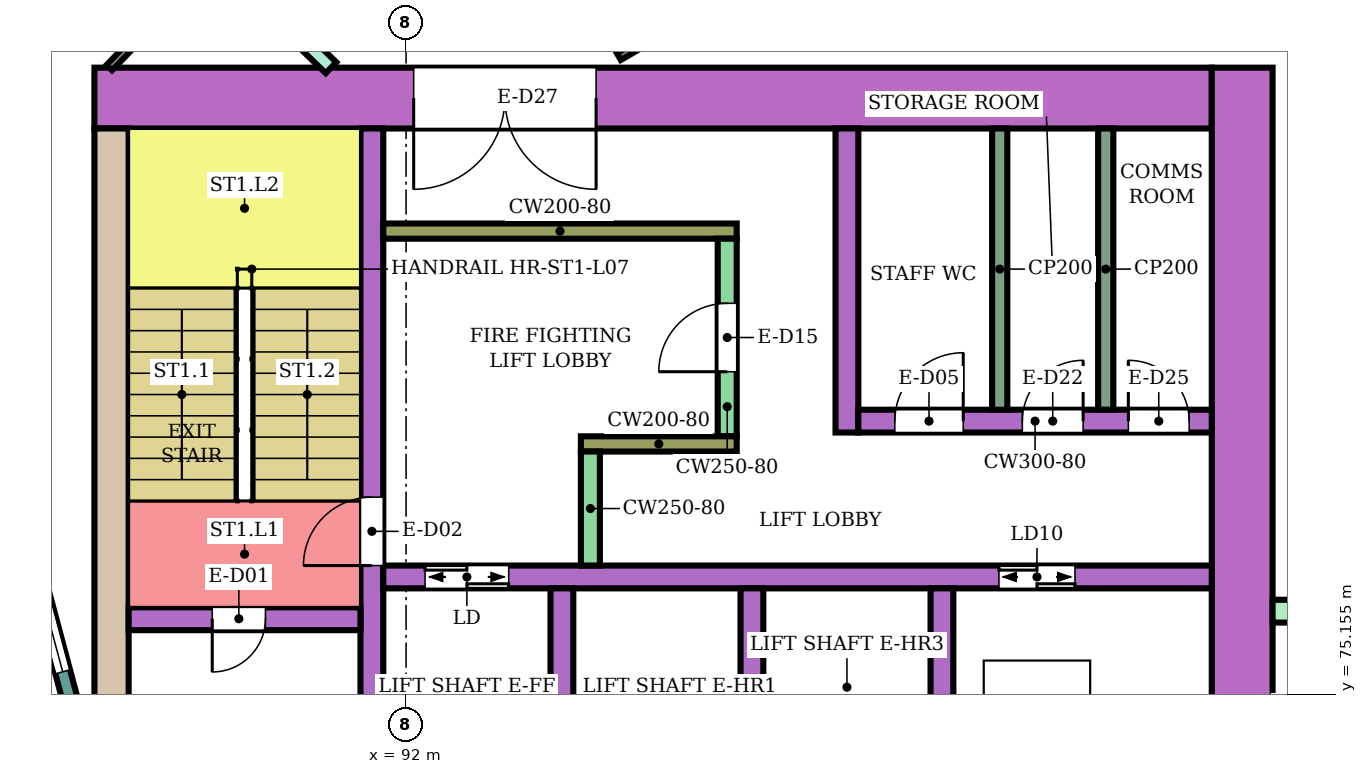
"""IFC4 building model, lengths in metres.
Left out: names, types, materials, properties, quantities, classifications, styles, units other than length and angle.
Written with IfcOpenShell. Run it as: python <this file> out.ifc"""

import sys

from ifc_helpers import new_model, si_unit, direction, frame, frame_2d, origin, place, context, subcontext, project, spatial, rectangle, extrude, element, fill, save


model = new_model("IFC4")
c1 = context("Model", 3, precision=1e-05, world=origin(), true_north=direction((0.0, 1.0)))
c2 = subcontext(c1, "Body", "Model", "MODEL_VIEW")
j1 = project(units=[si_unit("LENGTHUNIT", "METRE"), si_unit("PLANEANGLEUNIT", "RADIAN")], contexts=[c1])
p1 = place(None, origin())
s1 = spatial("IfcSite", under=j1, at=p1, CompositionType="ELEMENT")
p2 = place(p1, origin())
s2 = spatial("IfcBuilding", under=s1, at=p2, CompositionType="ELEMENT")
p3 = place(p2, frame((0.0, 0.0, 36.4)))
s3 = spatial("IfcBuildingStorey", under=s2, at=p3, CompositionType="ELEMENT", Elevation=36.4)
p4 = place(p3, frame((87.9, 83.0, 0.0), z_axis=(0.0, 0.0, 1.0), x_axis=(1.0, 0.0, 0.0)))
e1 = element("IfcWall", 1, at=p4, inside=s3, PredefinedType="SHEAR", context=c2, shape_type="SweptSolid", body=[
    extrude(rectangle(XDim=14.7, YDim=0.8, at=frame_2d((7.35, 0.0))), origin(), (0.0, 0.0, 1.0), 3.48),
])
p5 = place(p4, frame((4.2, 0.0, 0.0)))
e2 = element("IfcOpeningElement", 2, at=p5, cuts=e1, PredefinedType="OPENING", context=c2, shape_type="SweptSolid", body=[
    extrude(rectangle(XDim=2.4, YDim=2.4, at=frame_2d((1.2, 1.2))), frame((0.0, 0.41, 0.0), z_axis=(0.0, -1.0, 0.0), x_axis=(1.0, 0.0, 0.0)), (0.0, 0.0, 1.0), 0.82),
])
p6 = place(p3, frame((88.125, 75.0, 0.0), z_axis=(0.0, 0.0, 1.0), x_axis=(0.0, 1.0, 0.0)))
e3 = element("IfcWall", 3, at=p6, inside=s3, PredefinedType="SHEAR", context=c2, shape_type="SweptSolid", body=[
    extrude(rectangle(XDim=7.6, YDim=0.45, at=frame_2d((3.8, 0.0))), origin(), (0.0, 0.0, 1.0), 3.48),
])
p7 = place(p3, frame((103.0, 66.6, 0.0), z_axis=(0.0, 0.0, 1.0), x_axis=(0.0, 1.0, 0.0)))
e4 = element("IfcWall", 4, at=p7, inside=s3, PredefinedType="SHEAR", context=c2, shape_type="SweptSolid", body=[
    extrude(rectangle(XDim=16.8, YDim=0.8, at=frame_2d((8.4, 0.0))), origin(), (0.0, 0.0, 1.0), 3.48),
])
p8 = place(p3, frame((91.55, 75.0, 0.0), z_axis=(0.0, 0.0, 1.0), x_axis=(0.0, 1.0, 0.0)))
e5 = element("IfcWall", 5, at=p8, inside=s3, PredefinedType="SHEAR", context=c2, shape_type="SweptSolid", body=[
    extrude(rectangle(XDim=7.6, YDim=0.3, at=frame_2d((3.8, 0.0))), origin(), (0.0, 0.0, 1.0), 3.48),
])
p9 = place(p8, frame((1.85, 0.0, 0.0)))
e6 = element("IfcOpeningElement", 6, at=p9, cuts=e5, PredefinedType="OPENING", context=c2, shape_type="SweptSolid", body=[
    extrude(rectangle(XDim=0.9, YDim=2.1, at=frame_2d((0.45, 1.05))), frame((0.0, 0.16, 0.0), z_axis=(0.0, -1.0, 0.0), x_axis=(1.0, 0.0, 0.0)), (0.0, 0.0, 1.0), 0.32),
])
p10 = place(p3, frame((88.35, 76.15, 0.0), z_axis=(0.0, 0.0, 1.0), x_axis=(1.0, 0.0, 0.0)))
e7 = element("IfcWall", 7, at=p10, inside=s3, PredefinedType="SHEAR", context=c2, shape_type="SweptSolid", body=[
    extrude(rectangle(XDim=3.05, YDim=0.3, at=frame_2d((1.525, 0.0))), origin(), (0.0, 0.0, 1.0), 3.48),
])
p11 = place(p10, frame((1.1, 0.0, 0.0)))
e8 = element("IfcOpeningElement", 8, at=p11, cuts=e7, PredefinedType="OPENING", context=c2, shape_type="SweptSolid", body=[
    extrude(rectangle(XDim=0.7, YDim=2.0, at=frame_2d((0.35, 1.0))), frame((0.0, 0.16, 0.0), z_axis=(0.0, -1.0, 0.0), x_axis=(1.0, 0.0, 0.0)), (0.0, 0.0, 1.0), 0.32),
])
p12 = place(p3, frame((91.7, 76.7, 0.0), z_axis=(0.0, 0.0, 1.0), x_axis=(1.0, 0.0, 0.0)))
e9 = element("IfcWall", 9, at=p12, inside=s3, PredefinedType="SHEAR", context=c2, shape_type="SweptSolid", body=[
    extrude(rectangle(XDim=10.9, YDim=0.3, at=frame_2d((5.45, 0.0))), origin(), (0.0, 0.0, 1.0), 3.48),
])
p13 = place(p12, frame((0.55, 0.0, 0.0)))
e10 = element("IfcOpeningElement", 10, at=p13, cuts=e9, PredefinedType="OPENING", context=c2, shape_type="SweptSolid", body=[
    extrude(rectangle(XDim=1.1, YDim=2.1, at=frame_2d((0.55, 1.05))), frame((0.0, 0.16, 0.0), z_axis=(0.0, -1.0, 0.0), x_axis=(1.0, 0.0, 0.0)), (0.0, 0.0, 1.0), 0.32),
])
p14 = place(p12, frame((8.1, 0.0, 0.0)))
e11 = element("IfcOpeningElement", 11, at=p14, cuts=e9, PredefinedType="OPENING", context=c2, shape_type="SweptSolid", body=[
    extrude(rectangle(XDim=1.0, YDim=2.1, at=frame_2d((0.5, 1.05))), frame((0.0, 0.16, 0.0), z_axis=(0.0, -1.0, 0.0), x_axis=(1.0, 0.0, 0.0)), (0.0, 0.0, 1.0), 0.32),
])
for number, where, z_axis, x_axis in (
    (12, (94.05, 74.0, 0.0), (0.0, 0.0, 1.0), (0.0, 1.0, 0.0)),
    (13, (96.55, 74.0, 0.0), (0.0, 0.0, 1.0), (0.0, 1.0, 0.0)),
    (14, (99.05, 74.0, 0.0), (0.0, 0.0, 1.0), (0.0, 1.0, 0.0)),
):
    element("IfcWall", number, at=place(p3, frame(where, z_axis=z_axis, x_axis=x_axis)), inside=s3, PredefinedType="SHEAR", context=c2, shape_type="SweptSolid", body=[
        extrude(rectangle(XDim=2.55, YDim=0.3, at=frame_2d((1.275, 0.0))), origin(), (0.0, 0.0, 1.0), 3.48),
    ])
p15 = place(p3, frame((91.7, 81.25, 0.0), z_axis=(0.0, 0.0, 1.0), x_axis=(1.0, 0.0, 0.0)))
e15 = element("IfcWall", 15, at=p15, inside=s3, PredefinedType="SHEAR", context=c2, shape_type="SweptSolid", body=[
    extrude(rectangle(XDim=4.65, YDim=0.2, at=frame_2d((2.325, 0.0))), origin(), (0.0, 0.0, 1.0), 3.48),
])
p16 = place(p3, frame((96.225, 78.55, 0.0), z_axis=(0.0, 0.0, 1.0), x_axis=(0.0, 1.0, 0.0)))
e16 = element("IfcWall", 16, at=p16, inside=s3, PredefinedType="SHEAR", context=c2, shape_type="SweptSolid", body=[
    extrude(rectangle(XDim=2.6, YDim=0.25, at=frame_2d((1.3, 0.0))), origin(), (0.0, 0.0, 1.0), 3.48),
])
p17 = place(p16, frame((0.85, 0.0, 0.0)))
e17 = element("IfcOpeningElement", 17, at=p17, cuts=e16, PredefinedType="OPENING", context=c2, shape_type="SweptSolid", body=[
    extrude(rectangle(XDim=0.9, YDim=2.1, at=frame_2d((0.45, 1.05))), frame((0.0, 0.135, 0.0), z_axis=(0.0, -1.0, 0.0), x_axis=(1.0, 0.0, 0.0)), (0.0, 0.0, 1.0), 0.27),
])
p18 = place(p3, frame((94.3, 78.45, 0.0), z_axis=(0.0, 0.0, 1.0), x_axis=(1.0, 0.0, 0.0)))
e18 = element("IfcWall", 18, at=p18, inside=s3, PredefinedType="SHEAR", context=c2, shape_type="SweptSolid", body=[
    extrude(rectangle(XDim=2.05, YDim=0.2, at=frame_2d((1.025, 0.0))), origin(), (0.0, 0.0, 1.0), 3.48),
])
p19 = place(p3, frame((94.425, 76.85, 0.0), z_axis=(0.0, 0.0, 1.0), x_axis=(0.0, 1.0, 0.0)))
e19 = element("IfcWall", 19, at=p19, inside=s3, PredefinedType="SHEAR", context=c2, shape_type="SweptSolid", body=[
    extrude(rectangle(XDim=1.5, YDim=0.25, at=frame_2d((0.75, 0.0))), origin(), (0.0, 0.0, 1.0), 3.48),
])
p20 = place(p3, frame((97.8, 78.6, 0.0), z_axis=(0.0, 0.0, 1.0), x_axis=(0.0, 1.0, 0.0)))
e20 = element("IfcWall", 20, at=p20, inside=s3, PredefinedType="SHEAR", context=c2, shape_type="SweptSolid", body=[
    extrude(rectangle(XDim=4.0, YDim=0.3, at=frame_2d((2.0, 0.0))), origin(), (0.0, 0.0, 1.0), 3.48),
])
p21 = place(p3, frame((97.95, 78.75, 0.0), z_axis=(0.0, 0.0, 1.0), x_axis=(1.0, 0.0, 0.0)))
e21 = element("IfcWall", 21, at=p21, inside=s3, PredefinedType="SHEAR", context=c2, shape_type="SweptSolid", body=[
    extrude(rectangle(XDim=4.65, YDim=0.3, at=frame_2d((2.325, 0.0))), origin(), (0.0, 0.0, 1.0), 3.48),
])
p22 = place(p21, frame((0.48, 0.0, 0.0)))
e22 = element("IfcOpeningElement", 22, at=p22, cuts=e21, PredefinedType="OPENING", context=c2, shape_type="SweptSolid", body=[
    extrude(rectangle(XDim=0.9, YDim=2.1, at=frame_2d((0.45, 1.05))), frame((0.0, 0.16, 0.0), z_axis=(0.0, -1.0, 0.0), x_axis=(1.0, 0.0, 0.0)), (0.0, 0.0, 1.0), 0.32),
])
p23 = place(p21, frame((2.157, 0.0, 0.0)))
e23 = element("IfcOpeningElement", 23, at=p23, cuts=e21, PredefinedType="OPENING", context=c2, shape_type="SweptSolid", body=[
    extrude(rectangle(XDim=0.8, YDim=2.1, at=frame_2d((0.4, 1.05))), frame((0.0, 0.16, 0.0), z_axis=(0.0, -1.0, 0.0), x_axis=(1.0, 0.0, 0.0)), (0.0, 0.0, 1.0), 0.32),
])
p24 = place(p21, frame((3.552, 0.0, 0.0)))
e24 = element("IfcOpeningElement", 24, at=p24, cuts=e21, PredefinedType="OPENING", context=c2, shape_type="SweptSolid", body=[
    extrude(rectangle(XDim=0.8, YDim=2.1, at=frame_2d((0.4, 1.05))), frame((0.0, 0.16, 0.0), z_axis=(0.0, -1.0, 0.0), x_axis=(1.0, 0.0, 0.0)), (0.0, 0.0, 1.0), 0.32),
])
p25 = place(p3, frame((103.4, 76.25, 0.0), z_axis=(0.0, 0.0, 1.0), x_axis=(1.0, 0.0, 0.0)))
e25 = element("IfcWall", 25, at=p25, inside=s3, PredefinedType="NOTDEFINED", context=c2, shape_type="SweptSolid", body=[
    extrude(rectangle(XDim=2.416, YDim=0.3, at=frame_2d((1.208, 0.0))), origin(), (0.0, 0.0, 1.0), 3.8),
])
p26 = place(p3, frame((87.604, 75.0, 0.0), z_axis=(0.0, 0.0, 1.0), x_axis=(-0.258789828301, 0.965933654434, 0.0)))
e26 = element("IfcWall", 26, at=p26, inside=s3, PredefinedType="NOTDEFINED", context=c2, shape_type="SweptSolid", body=[
    extrude(rectangle(XDim=3.936, YDim=0.2, at=frame_2d((1.968, 0.0))), origin(), (0.0, 0.0, 1.0), 3.8),
])
p27 = place(p26, frame((0.468, 0.0, 0.9)))
e27 = element("IfcOpeningElement", 27, at=p27, cuts=e26, PredefinedType="OPENING", context=c2, shape_type="SweptSolid", body=[
    extrude(rectangle(XDim=3.0, YDim=2.3, at=frame_2d((1.5, 1.15))), frame((0.0, 0.11, 0.0), z_axis=(0.0, -1.0, 0.0), x_axis=(1.0, 0.0, 0.0)), (0.0, 0.0, 1.0), 0.22),
])
p28 = place(p3, frame((87.064, 87.211, 0.0), z_axis=(0.0, 0.0, 1.0), x_axis=(0.719540958932, -0.694450004262, 0.0)))
e28 = element("IfcWall", 28, at=p28, inside=s3, PredefinedType="PARTITIONING", context=c2, shape_type="SweptSolid", body=[
    extrude(rectangle(XDim=5.488, YDim=0.2, at=frame_2d((2.744, 0.0))), origin(), (0.0, 0.0, 1.0), 3.35),
])
p29 = place(p28, frame((0.55, 0.0, 0.0)))
e29 = element("IfcOpeningElement", 29, at=p29, cuts=e28, PredefinedType="OPENING", context=c2, shape_type="SweptSolid", body=[
    extrude(rectangle(XDim=1.0, YDim=2.1, at=frame_2d((0.5, 1.05))), frame((0.0, 0.11, 0.0), z_axis=(0.0, -1.0, 0.0), x_axis=(1.0, 0.0, 0.0)), (0.0, 0.0, 1.0), 0.22),
])
p30 = place(p3, frame((88.095, 83.4, 0.0), z_axis=(0.0, 0.0, 1.0), x_axis=(0.694447472534, 0.719543402368, 0.0)))
e30 = element("IfcWall", 30, at=p30, inside=s3, PredefinedType="PARTITIONING", context=c2, shape_type="SweptSolid", body=[
    extrude(rectangle(XDim=1.926, YDim=0.1, at=frame_2d((0.963, 0.0))), origin(), (0.0, 0.0, 1.0), 3.35),
])
p31 = place(p30, frame((0.613, 0.0, 0.0)))
e31 = element("IfcOpeningElement", 31, at=p31, cuts=e30, PredefinedType="OPENING", context=c2, shape_type="SweptSolid", body=[
    extrude(rectangle(XDim=0.8, YDim=2.1, at=frame_2d((0.4, 1.05))), frame((0.0, 0.06, 0.0), z_axis=(0.0, -1.0, 0.0), x_axis=(1.0, 0.0, 0.0)), (0.0, 0.0, 1.0), 0.12),
])
p32 = place(p3, frame((94.8, 83.545, 0.0), z_axis=(0.0, 0.0, 1.0), x_axis=(0.86602264145, 0.500004784474, 0.0)))
e32 = element("IfcWall", 32, at=p32, inside=s3, PredefinedType="PARTITIONING", context=c2, shape_type="SweptSolid", body=[
    extrude(rectangle(XDim=8.708, YDim=0.1, at=frame_2d((4.354, 0.0))), origin(), (0.0, 0.0, 1.0), 3.35),
])
p33 = place(p32, frame((3.879, 0.0, 0.0)))
e33 = element("IfcOpeningElement", 33, at=p33, cuts=e32, PredefinedType="OPENING", context=c2, shape_type="SweptSolid", body=[
    extrude(rectangle(XDim=0.9, YDim=2.1, at=frame_2d((0.45, 1.05))), frame((0.0, 0.06, 0.0), z_axis=(0.0, -1.0, 0.0), x_axis=(1.0, 0.0, 0.0)), (0.0, 0.0, 1.0), 0.12),
])
for number, where, z_axis, x_axis in (
    (34, (99.81, 78.9, 0.0), (0.0, 0.0, 1.0), (0.0, 1.0, 0.0)),
    (35, (101.205, 78.9, 0.0), (0.0, 0.0, 1.0), (0.0, 1.0, 0.0)),
):
    element("IfcWall", number, at=place(p3, frame(where, z_axis=z_axis, x_axis=x_axis)), inside=s3, PredefinedType="PARTITIONING", context=c2, shape_type="SweptSolid", body=[
        extrude(rectangle(XDim=3.7, YDim=0.2, at=frame_2d((1.85, 0.0))), origin(), (0.0, 0.0, 1.0), 3.48),
    ])
p34 = place(p27, origin())
e36 = element("IfcWindow", 36, at=p34, inside=s3, PartitioningType="SINGLE_PANEL", PredefinedType="WINDOW", context=c2, shape_type="SweptSolid", body=[
    extrude(rectangle(XDim=3.0, YDim=2.3, at=frame_2d((1.5, 1.15))), frame((0.0, 0.03, 0.0), z_axis=(0.0, -1.0, 0.0), x_axis=(1.0, 0.0, 0.0)), (0.0, 0.0, 1.0), 0.06),
])
fill(e27, e36)
p35 = place(p11, frame((0.7, 0.0, 0.0), z_axis=(0.0, 0.0, 1.0), x_axis=(-1.0, 0.0, 0.0)))
e37 = element("IfcDoor", 37, at=p35, inside=s3, OperationType="SINGLE_SWING_RIGHT", PredefinedType="DOOR", context=c2, shape_type="SweptSolid", body=[
    extrude(rectangle(XDim=0.7, YDim=2.0, at=frame_2d((0.35, 1.0))), frame((0.0, 0.025, 0.0), z_axis=(0.0, -1.0, 0.0), x_axis=(1.0, 0.0, 0.0)), (0.0, 0.0, 1.0), 0.05),
])
fill(e8, e37)
p36 = place(p9, origin())
e38 = element("IfcDoor", 38, at=p36, inside=s3, OperationType="SINGLE_SWING_LEFT", PredefinedType="DOOR", context=c2, shape_type="SweptSolid", body=[
    extrude(rectangle(XDim=0.9, YDim=2.1, at=frame_2d((0.45, 1.05))), frame((0.0, 0.025, 0.0), z_axis=(0.0, -1.0, 0.0), x_axis=(1.0, 0.0, 0.0)), (0.0, 0.0, 1.0), 0.05),
])
fill(e6, e38)
p37 = place(p13, origin())
e39 = element("IfcDoor", 39, at=p37, inside=s3, OperationType="DOUBLE_DOOR_SLIDING", PredefinedType="DOOR", context=c2, shape_type="SweptSolid", body=[
    extrude(rectangle(XDim=1.1, YDim=2.1, at=frame_2d((0.55, 1.05))), frame((0.0, 0.025, 0.0), z_axis=(0.0, -1.0, 0.0), x_axis=(1.0, 0.0, 0.0)), (0.0, 0.0, 1.0), 0.05),
])
fill(e10, e39)
p38 = place(p14, origin())
e40 = element("IfcDoor", 40, at=p38, inside=s3, OperationType="DOUBLE_DOOR_SLIDING", PredefinedType="DOOR", context=c2, shape_type="SweptSolid", body=[
    extrude(rectangle(XDim=1.0, YDim=2.1, at=frame_2d((0.5, 1.05))), frame((0.0, 0.025, 0.0), z_axis=(0.0, -1.0, 0.0), x_axis=(1.0, 0.0, 0.0)), (0.0, 0.0, 1.0), 0.05),
])
fill(e11, e40)
p39 = place(p17, origin())
e41 = element("IfcDoor", 41, at=p39, inside=s3, OperationType="SINGLE_SWING_LEFT", PredefinedType="DOOR", context=c2, shape_type="SweptSolid", body=[
    extrude(rectangle(XDim=0.9, YDim=2.1, at=frame_2d((0.45, 1.05))), frame((0.0, 0.025, 0.0), z_axis=(0.0, -1.0, 0.0), x_axis=(1.0, 0.0, 0.0)), (0.0, 0.0, 1.0), 0.05),
])
fill(e17, e41)
p40 = place(p22, origin())
e42 = element("IfcDoor", 42, at=p40, inside=s3, OperationType="SINGLE_SWING_RIGHT", PredefinedType="DOOR", context=c2, shape_type="SweptSolid", body=[
    extrude(rectangle(XDim=0.9, YDim=2.1, at=frame_2d((0.45, 1.05))), frame((0.0, 0.025, 0.0), z_axis=(0.0, -1.0, 0.0), x_axis=(1.0, 0.0, 0.0)), (0.0, 0.0, 1.0), 0.05),
])
fill(e22, e42)
p41 = place(p23, origin())
e43 = element("IfcDoor", 43, at=p41, inside=s3, OperationType="SINGLE_SWING_RIGHT", PredefinedType="DOOR", context=c2, shape_type="SweptSolid", body=[
    extrude(rectangle(XDim=0.8, YDim=2.1, at=frame_2d((0.4, 1.05))), frame((0.0, 0.025, 0.0), z_axis=(0.0, -1.0, 0.0), x_axis=(1.0, 0.0, 0.0)), (0.0, 0.0, 1.0), 0.05),
])
fill(e23, e43)
p42 = place(p24, origin())
e44 = element("IfcDoor", 44, at=p42, inside=s3, OperationType="SINGLE_SWING_LEFT", PredefinedType="DOOR", context=c2, shape_type="SweptSolid", body=[
    extrude(rectangle(XDim=0.8, YDim=2.1, at=frame_2d((0.4, 1.05))), frame((0.0, 0.025, 0.0), z_axis=(0.0, -1.0, 0.0), x_axis=(1.0, 0.0, 0.0)), (0.0, 0.0, 1.0), 0.05),
])
fill(e24, e44)
p43 = place(p5, frame((2.4, 0.0, 0.0), z_axis=(0.0, 0.0, 1.0), x_axis=(-1.0, 0.0, 0.0)))
e45 = element("IfcDoor", 45, at=p43, inside=s3, OperationType="DOUBLE_DOOR_SINGLE_SWING", PredefinedType="DOOR", context=c2, shape_type="SweptSolid", body=[
    extrude(rectangle(XDim=2.4, YDim=2.4, at=frame_2d((1.2, 1.2))), frame((0.0, 0.025, 0.0), z_axis=(0.0, -1.0, 0.0), x_axis=(1.0, 0.0, 0.0)), (0.0, 0.0, 1.0), 0.05),
])
fill(e2, e45)
save(model, sys.argv[1])
